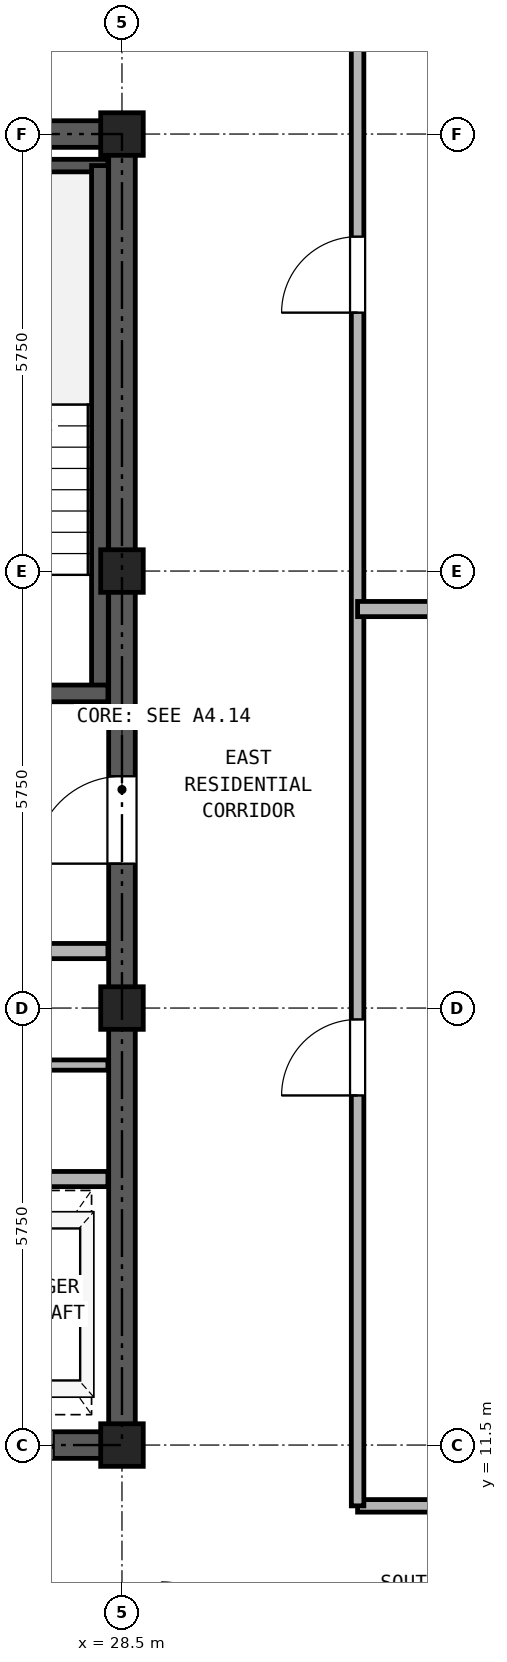
"""IFC4 building model, lengths in metres.
Left out: names, types, materials, properties, quantities, classifications, styles, units other than length and angle.
Written with IfcOpenShell. Run it as: python <this file> out.ifc"""

import sys

from ifc_helpers import new_model, si_unit, direction, frame, frame_2d, origin, origin_2d, place, context, subcontext, project, spatial, rectangle, hollow_rectangle, extrude, source, transform, mapped, element, fill, save


model = new_model("IFC4")
c1 = context("Model", 3, precision=1e-05, world=origin(), true_north=direction((0.0, 1.0)))
c2 = subcontext(c1, "Body", "Model", "MODEL_VIEW")
j1 = project(units=[si_unit("LENGTHUNIT", "METRE"), si_unit("PLANEANGLEUNIT", "RADIAN")], contexts=[c1])
p1 = place(None, origin())
s1 = spatial("IfcSite", under=j1, at=p1, CompositionType="ELEMENT")
p2 = place(p1, origin())
s2 = spatial("IfcBuilding", under=s1, at=p2, CompositionType="ELEMENT")
p3 = place(p2, frame((0.0, 0.0, 242.5)))
s3 = spatial("IfcBuildingStorey", under=s2, at=p3, CompositionType="ELEMENT", Elevation=242.5)
m1 = source(origin(), c2, "Body", "SweptSolid", [
    extrude(hollow_rectangle(XDim=0.56, YDim=0.56, WallThickness=0.03, at=origin_2d()), origin(), (0.0, 0.0, 1.0), 2.98),
])
for number, where, z_axis, x_axis in (
    (1, (28.5, 11.5, 0.0), (0.0, 0.0, 1.0), (1.0, 0.0, 0.0)),
    (2, (28.5, 17.25, 0.0), (0.0, 0.0, 1.0), (1.0, 0.0, 0.0)),
    (3, (28.5, 23.0, 0.0), (0.0, 0.0, 1.0), (1.0, 0.0, 0.0)),
    (4, (28.5, 28.75, 0.0), (0.0, 0.0, 1.0), (1.0, 0.0, 0.0)),
):
    element("IfcColumn", number, at=place(p3, frame(where, z_axis=z_axis, x_axis=x_axis)), inside=s3, PredefinedType="COLUMN", context=c2, shape_type="MappedRepresentation", body=[
        mapped(m1, transform((0.0, 0.0, 0.0), x_axis=(1.0, 0.0, 0.0), y_axis=(0.0, 1.0, 0.0), z_axis=(0.0, 0.0, 1.0), scale=1.0)),
    ])
p4 = place(p3, frame((18.325, 11.5, 0.0), z_axis=(0.0, 0.0, 1.0), x_axis=(1.0, 0.0, 0.0)))
e5 = element("IfcWall", 5, at=p4, inside=s3, PredefinedType="SHEAR", context=c2, shape_type="SweptSolid", body=[
    extrude(rectangle(XDim=10.35, YDim=0.35, at=frame_2d((5.175, 0.0))), origin(), (0.0, 0.0, 1.0), 2.98),
])
p5 = place(p4, frame((1.775, 0.0, 0.0)))
e6 = element("IfcOpeningElement", 6, at=p5, cuts=e5, PredefinedType="OPENING", context=c2, shape_type="SweptSolid", body=[
    extrude(rectangle(XDim=0.95, YDim=2.15, at=frame_2d((0.475, 1.075))), frame((0.0, 0.185, 0.0), z_axis=(0.0, -1.0, 0.0), x_axis=(1.0, 0.0, 0.0)), (0.0, 0.0, 1.0), 0.37),
])
p6 = place(p4, frame((5.275, 0.0, 0.0)))
e7 = element("IfcOpeningElement", 7, at=p6, cuts=e5, PredefinedType="OPENING", context=c2, shape_type="SweptSolid", body=[
    extrude(rectangle(XDim=0.95, YDim=2.15, at=frame_2d((0.475, 1.075))), frame((0.0, 0.185, 0.0), z_axis=(0.0, -1.0, 0.0), x_axis=(1.0, 0.0, 0.0)), (0.0, 0.0, 1.0), 0.37),
])
p7 = place(p4, frame((8.175, 0.0, 0.0)))
e8 = element("IfcOpeningElement", 8, at=p7, cuts=e5, PredefinedType="OPENING", context=c2, shape_type="SweptSolid", body=[
    extrude(rectangle(XDim=1.1, YDim=2.25, at=frame_2d((0.55, 1.125))), frame((0.0, 0.185, 0.0), z_axis=(0.0, -1.0, 0.0), x_axis=(1.0, 0.0, 0.0)), (0.0, 0.0, 1.0), 0.37),
])
p8 = place(p3, frame((18.325, 28.75, 0.0), z_axis=(0.0, 0.0, 1.0), x_axis=(1.0, 0.0, 0.0)))
e9 = element("IfcWall", 9, at=p8, inside=s3, PredefinedType="SHEAR", context=c2, shape_type="SweptSolid", body=[
    extrude(rectangle(XDim=10.35, YDim=0.35, at=frame_2d((5.175, 0.0))), origin(), (0.0, 0.0, 1.0), 2.98),
])
p9 = place(p8, frame((4.055, 0.0, 0.0)))
e10 = element("IfcOpeningElement", 10, at=p9, cuts=e9, PredefinedType="OPENING", context=c2, shape_type="SweptSolid", body=[
    extrude(rectangle(XDim=0.9, YDim=2.05, at=frame_2d((0.45, 1.025))), frame((0.0, 0.185, 0.0), z_axis=(0.0, -1.0, 0.0), x_axis=(1.0, 0.0, 0.0)), (0.0, 0.0, 1.0), 0.37),
])
p10 = place(p8, frame((5.595, 0.0, 0.0)))
e11 = element("IfcOpeningElement", 11, at=p10, cuts=e9, PredefinedType="OPENING", context=c2, shape_type="SweptSolid", body=[
    extrude(rectangle(XDim=0.9, YDim=2.05, at=frame_2d((0.45, 1.025))), frame((0.0, 0.185, 0.0), z_axis=(0.0, -1.0, 0.0), x_axis=(1.0, 0.0, 0.0)), (0.0, 0.0, 1.0), 0.37),
])
p11 = place(p3, frame((28.5, 11.675, 0.0), z_axis=(0.0, 0.0, 1.0), x_axis=(0.0, 1.0, 0.0)))
e12 = element("IfcWall", 12, at=p11, inside=s3, PredefinedType="SHEAR", context=c2, shape_type="SweptSolid", body=[
    extrude(rectangle(XDim=16.9, YDim=0.35, at=frame_2d((8.45, 0.0))), origin(), (0.0, 0.0, 1.0), 2.98),
])
p12 = place(p11, frame((7.475, 0.0, 0.0)))
e13 = element("IfcOpeningElement", 13, at=p12, cuts=e12, PredefinedType="OPENING", context=c2, shape_type="SweptSolid", body=[
    extrude(rectangle(XDim=1.15, YDim=2.2, at=frame_2d((0.575, 1.1))), frame((0.0, 0.185, 0.0), z_axis=(0.0, -1.0, 0.0), x_axis=(1.0, 0.0, 0.0)), (0.0, 0.0, 1.0), 0.37),
])
p13 = place(p3, frame((25.13, 28.335, 0.0), z_axis=(0.0, 0.0, 1.0), x_axis=(1.0, 0.0, 0.0)))
e14 = element("IfcWall", 14, at=p13, inside=s3, PredefinedType="PARTITIONING", context=c2, shape_type="SweptSolid", body=[
    extrude(rectangle(XDim=3.185, YDim=0.165, at=frame_2d((1.593, 0.0))), origin(), (0.0, 0.0, 1.0), 2.98),
])
p14 = place(p3, frame((28.21, 21.39, 0.0), z_axis=(0.0, 0.0, 1.0), x_axis=(0.0, 1.0, 0.0)))
e15 = element("IfcWall", 15, at=p14, inside=s3, PredefinedType="SOLIDWALL", context=c2, shape_type="SweptSolid", body=[
    extrude(rectangle(XDim=6.945, YDim=0.22, at=frame_2d((3.473, 0.0))), origin(), (0.0, 0.0, 1.0), 2.98),
])
p15 = place(p3, frame((25.13, 21.39, 0.0), z_axis=(0.0, 0.0, 1.0), x_axis=(1.0, 0.0, 0.0)))
e16 = element("IfcWall", 16, at=p15, inside=s3, PredefinedType="SOLIDWALL", context=c2, shape_type="SweptSolid", body=[
    extrude(rectangle(XDim=3.185, YDim=0.22, at=frame_2d((1.593, 0.0))), origin(), (0.0, 0.0, 1.0), 2.98),
])
p16 = place(p15, frame((0.92, 0.0, 0.0)))
e17 = element("IfcOpeningElement", 17, at=p16, cuts=e16, PredefinedType="OPENING", context=c2, shape_type="SweptSolid", body=[
    extrude(rectangle(XDim=1.15, YDim=2.2, at=frame_2d((0.575, 1.1))), frame((0.0, 0.12, 0.0), z_axis=(0.0, -1.0, 0.0), x_axis=(1.0, 0.0, 0.0)), (0.0, 0.0, 1.0), 0.24),
])
p17 = place(p3, frame((18.685, 18.0, 0.0), z_axis=(0.0, 0.0, 1.0), x_axis=(1.0, 0.0, 0.0)))
e18 = element("IfcWall", 18, at=p17, inside=s3, PredefinedType="PARTITIONING", context=c2, shape_type="SweptSolid", body=[
    extrude(rectangle(XDim=9.63, YDim=0.2, at=frame_2d((4.815, 0.0))), origin(), (0.0, 0.0, 1.0), 2.98),
])
p18 = place(p17, frame((0.565, 0.0, 0.0)))
e19 = element("IfcOpeningElement", 19, at=p18, cuts=e18, PredefinedType="OPENING", context=c2, shape_type="SweptSolid", body=[
    extrude(rectangle(XDim=1.3, YDim=2.3, at=frame_2d((0.65, 1.15))), frame((0.0, 0.11, 0.0), z_axis=(0.0, -1.0, 0.0), x_axis=(1.0, 0.0, 0.0)), (0.0, 0.0, 1.0), 0.22),
])
p19 = place(p17, frame((2.665, 0.0, 0.0)))
e20 = element("IfcOpeningElement", 20, at=p19, cuts=e18, PredefinedType="OPENING", context=c2, shape_type="SweptSolid", body=[
    extrude(rectangle(XDim=1.3, YDim=2.3, at=frame_2d((0.65, 1.15))), frame((0.0, 0.11, 0.0), z_axis=(0.0, -1.0, 0.0), x_axis=(1.0, 0.0, 0.0)), (0.0, 0.0, 1.0), 0.22),
])
p20 = place(p17, frame((7.165, 0.0, 0.0)))
e21 = element("IfcOpeningElement", 21, at=p20, cuts=e18, PredefinedType="OPENING", context=c2, shape_type="SweptSolid", body=[
    extrude(rectangle(XDim=1.0, YDim=2.15, at=frame_2d((0.5, 1.075))), frame((0.0, 0.11, 0.0), z_axis=(0.0, -1.0, 0.0), x_axis=(1.0, 0.0, 0.0)), (0.0, 0.0, 1.0), 0.22),
])
p21 = place(p3, frame((18.685, 15.0, 0.0), z_axis=(0.0, 0.0, 1.0), x_axis=(1.0, 0.0, 0.0)))
e22 = element("IfcWall", 22, at=p21, inside=s3, PredefinedType="PARTITIONING", context=c2, shape_type="SweptSolid", body=[
    extrude(rectangle(XDim=9.63, YDim=0.2, at=frame_2d((4.815, 0.0))), origin(), (0.0, 0.0, 1.0), 2.98),
])
p22 = place(p3, frame((23.3, 16.5, 0.0), z_axis=(0.0, 0.0, 1.0), x_axis=(1.0, 0.0, 0.0)))
e23 = element("IfcWall", 23, at=p22, inside=s3, PredefinedType="PARTITIONING", context=c2, shape_type="SweptSolid", body=[
    extrude(rectangle(XDim=5.015, YDim=0.135, at=frame_2d((2.507, 0.0))), origin(), (0.0, 0.0, 1.0), 2.98),
])
p23 = place(p22, frame((2.55, 0.0, 0.0)))
e24 = element("IfcOpeningElement", 24, at=p23, cuts=e23, PredefinedType="OPENING", context=c2, shape_type="SweptSolid", body=[
    extrude(rectangle(XDim=0.9, YDim=2.05, at=frame_2d((0.45, 1.025))), frame((0.0, 0.077, 0.0), z_axis=(0.0, -1.0, 0.0), x_axis=(1.0, 0.0, 0.0)), (0.0, 0.0, 1.0), 0.155),
])
p24 = place(p3, frame((31.6, 10.7, 0.0), z_axis=(0.0, 0.0, 1.0), x_axis=(1.0, 0.0, 0.0)))
e25 = element("IfcWall", 25, at=p24, inside=s3, PredefinedType="PARTITIONING", context=c2, shape_type="SweptSolid", body=[
    extrude(rectangle(XDim=6.6, YDim=0.165, at=frame_2d((3.3, 0.0))), origin(), (0.0, 0.0, 1.0), 2.98),
])
p25 = place(p3, frame((31.6, 10.7, 0.0), z_axis=(0.0, 0.0, 1.0), x_axis=(0.0, 1.0, 0.0)))
e26 = element("IfcWall", 26, at=p25, inside=s3, PredefinedType="PARTITIONING", context=c2, shape_type="SweptSolid", body=[
    extrude(rectangle(XDim=24.44, YDim=0.165, at=frame_2d((12.22, 0.0))), origin(), (0.0, 0.0, 1.0), 2.98),
])
p26 = place(p25, frame((5.4, 0.0, 0.0)))
e27 = element("IfcOpeningElement", 27, at=p26, cuts=e26, PredefinedType="OPENING", context=c2, shape_type="SweptSolid", body=[
    extrude(rectangle(XDim=1.0, YDim=2.15, at=frame_2d((0.5, 1.075))), frame((0.0, 0.093, 0.0), z_axis=(0.0, -1.0, 0.0), x_axis=(1.0, 0.0, 0.0)), (0.0, 0.0, 1.0), 0.185),
])
p27 = place(p25, frame((15.7, 0.0, 0.0)))
e28 = element("IfcOpeningElement", 28, at=p27, cuts=e26, PredefinedType="OPENING", context=c2, shape_type="SweptSolid", body=[
    extrude(rectangle(XDim=1.0, YDim=2.15, at=frame_2d((0.5, 1.075))), frame((0.0, 0.093, 0.0), z_axis=(0.0, -1.0, 0.0), x_axis=(1.0, 0.0, 0.0)), (0.0, 0.0, 1.0), 0.185),
])
p28 = place(p3, frame((31.6, 22.5, 0.0), z_axis=(0.0, 0.0, 1.0), x_axis=(1.0, 0.0, 0.0)))
e29 = element("IfcWall", 29, at=p28, inside=s3, PredefinedType="PARTITIONING", context=c2, shape_type="SweptSolid", body=[
    extrude(rectangle(XDim=10.04, YDim=0.2, at=frame_2d((5.02, 0.0))), origin(), (0.0, 0.0, 1.0), 2.98),
])
p29 = place(p12, origin())
e30 = element("IfcDoor", 30, at=p29, inside=s3, OperationType="SINGLE_SWING_LEFT", PredefinedType="DOOR", context=c2, shape_type="SweptSolid", body=[
    extrude(rectangle(XDim=1.15, YDim=2.2, at=frame_2d((0.575, 1.1))), frame((0.0, 0.025, 0.0), z_axis=(0.0, -1.0, 0.0), x_axis=(1.0, 0.0, 0.0)), (0.0, 0.0, 1.0), 0.05),
])
fill(e13, e30)
p30 = place(p7, frame((1.1, 0.0, 0.0), z_axis=(0.0, 0.0, 1.0), x_axis=(-1.0, 0.0, 0.0)))
e31 = element("IfcDoor", 31, at=p30, inside=s3, OperationType="DOUBLE_DOOR_SLIDING", PredefinedType="DOOR", context=c2, shape_type="SweptSolid", body=[
    extrude(rectangle(XDim=1.1, YDim=2.25, at=frame_2d((0.55, 1.125))), frame((0.0, 0.025, 0.0), z_axis=(0.0, -1.0, 0.0), x_axis=(1.0, 0.0, 0.0)), (0.0, 0.0, 1.0), 0.05),
])
fill(e8, e31)
p31 = place(p26, frame((1.0, 0.0, 0.0), z_axis=(0.0, 0.0, 1.0), x_axis=(-1.0, 0.0, 0.0)))
e32 = element("IfcDoor", 32, at=p31, inside=s3, OperationType="SINGLE_SWING_LEFT", PredefinedType="DOOR", context=c2, shape_type="SweptSolid", body=[
    extrude(rectangle(XDim=1.0, YDim=2.15, at=frame_2d((0.5, 1.075))), frame((0.0, 0.025, 0.0), z_axis=(0.0, -1.0, 0.0), x_axis=(1.0, 0.0, 0.0)), (0.0, 0.0, 1.0), 0.05),
])
fill(e27, e32)
p32 = place(p27, frame((1.0, 0.0, 0.0), z_axis=(0.0, 0.0, 1.0), x_axis=(-1.0, 0.0, 0.0)))
e33 = element("IfcDoor", 33, at=p32, inside=s3, OperationType="SINGLE_SWING_LEFT", PredefinedType="DOOR", context=c2, shape_type="SweptSolid", body=[
    extrude(rectangle(XDim=1.0, YDim=2.15, at=frame_2d((0.5, 1.075))), frame((0.0, 0.025, 0.0), z_axis=(0.0, -1.0, 0.0), x_axis=(1.0, 0.0, 0.0)), (0.0, 0.0, 1.0), 0.05),
])
fill(e28, e33)
save(model, sys.argv[1])
